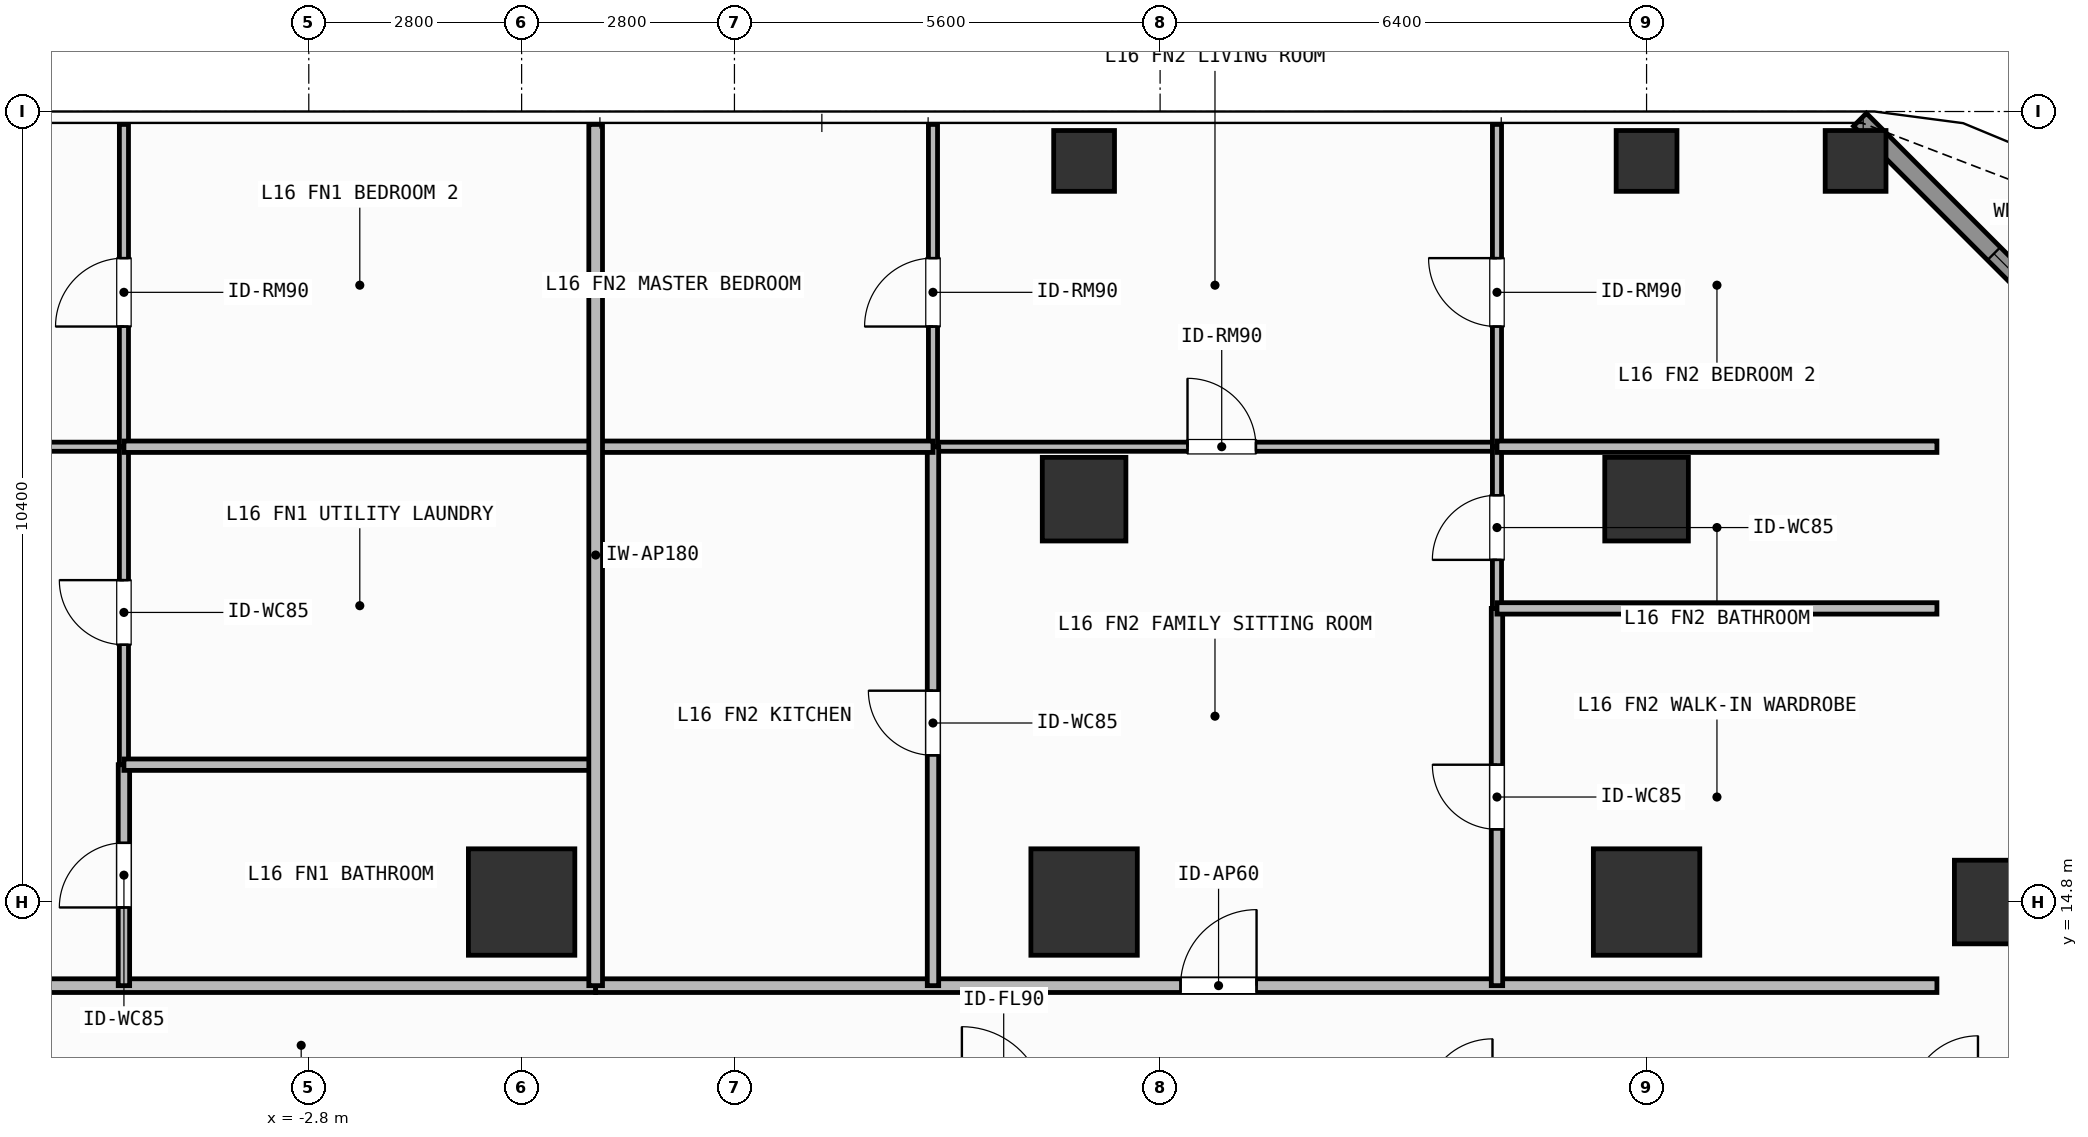
"""IFC4 building model, lengths in metres.
Left out: names, types, materials, properties, quantities, classifications, styles, units other than length and angle.
Written with IfcOpenShell. Run it as: python <this file> out.ifc"""

import sys

from ifc_helpers import new_model, si_unit, direction, frame, frame_2d, origin, origin_2d, place, context, subcontext, project, spatial, rectangle, hollow_rectangle, extrude, element, fill, save


model = new_model("IFC4")
c1 = context("Model", 3, precision=1e-05, world=origin(), true_north=direction((0.0, 1.0)))
c2 = subcontext(c1, "Body", "Model", "MODEL_VIEW")
j1 = project(units=[si_unit("LENGTHUNIT", "METRE"), si_unit("PLANEANGLEUNIT", "RADIAN")], contexts=[c1])
p1 = place(None, origin())
s1 = spatial("IfcSite", under=j1, at=p1, CompositionType="ELEMENT")
p2 = place(p1, origin())
s2 = spatial("IfcBuilding", under=s1, at=p2, CompositionType="ELEMENT")
p3 = place(p2, frame((0.0, 0.0, 61.8)))
s3 = spatial("IfcBuildingStorey", under=s2, at=p3, CompositionType="ELEMENT", Elevation=61.8)
for number, where, z_axis, x_axis in (
    (1, (0.0, 14.8, 0.0), (0.0, 0.0, 1.0), (1.0, 0.0, 0.0)),
    (2, (7.4, 14.8, 0.0), (0.0, 0.0, 1.0), (1.0, 0.0, 0.0)),
    (3, (14.8, 14.8, 0.0), (0.0, 0.0, 1.0), (1.0, 0.0, 0.0)),
):
    element("IfcColumn", number, at=place(p3, frame(where, z_axis=z_axis, x_axis=x_axis)), inside=s3, PredefinedType="COLUMN", context=c2, shape_type="SweptSolid", body=[
        extrude(rectangle(XDim=1.4, YDim=1.4, at=origin_2d()), origin(), (0.0, 0.0, 1.0), 3.9),
    ])
for number, where, z_axis, x_axis in (
    (4, (19.4, 14.8, 0.0), (0.0, 0.0, 1.0), (1.0, 0.0, 0.0)),
    (5, (7.4, 20.1, 0.0), (0.0, 0.0, 1.0), (1.0, 0.0, 0.0)),
    (6, (14.8, 20.1, 0.0), (0.0, 0.0, 1.0), (1.0, 0.0, 0.0)),
):
    element("IfcColumn", number, at=place(p3, frame(where, z_axis=z_axis, x_axis=x_axis)), inside=s3, PredefinedType="COLUMN", context=c2, shape_type="SweptSolid", body=[
        extrude(rectangle(XDim=1.1, YDim=1.1, at=origin_2d()), origin(), (0.0, 0.0, 1.0), 3.9),
    ])
for number, where, z_axis, x_axis in (
    (7, (17.55, 24.55, 0.0), (0.0, 0.0, 1.0), (1.0, 0.0, 0.0)),
    (8, (7.4, 24.55, 0.0), (0.0, 0.0, 1.0), (1.0, 0.0, 0.0)),
    (9, (14.8, 24.55, 0.0), (0.0, 0.0, 1.0), (1.0, 0.0, 0.0)),
):
    element("IfcColumn", number, at=place(p3, frame(where, z_axis=z_axis, x_axis=x_axis)), inside=s3, PredefinedType="COLUMN", context=c2, shape_type="SweptSolid", body=[
        extrude(hollow_rectangle(XDim=0.8, YDim=0.8, WallThickness=0.036, at=origin_2d()), origin(), (0.0, 0.0, 1.0), 3.9),
    ])
p4 = place(p3, frame((17.608, 25.092, 0.0), z_axis=(0.0, 0.0, 1.0), x_axis=(0.707106781187, -0.707106781187, 0.0)))
e10 = element("IfcWall", 10, at=p4, inside=s3, PredefinedType="SOLIDWALL", context=c2, shape_type="SweptSolid", body=[
    extrude(rectangle(XDim=6.484, YDim=0.24, at=frame_2d((3.242, 0.0))), origin(), (0.0, 0.0, 1.0), 3.68),
])
p5 = place(p4, frame((2.492, 0.0, 0.8)))
e11 = element("IfcOpeningElement", 11, at=p5, cuts=e10, PredefinedType="OPENING", context=c2, shape_type="SweptSolid", body=[
    extrude(rectangle(XDim=1.5, YDim=1.85, at=frame_2d((0.75, 0.925))), frame((0.0, 0.13, 0.0), z_axis=(0.0, -1.0, 0.0), x_axis=(1.0, 0.0, 0.0)), (0.0, 0.0, 1.0), 0.26),
])
p6 = place(p3, frame((-24.42, 13.7, 0.0), z_axis=(0.0, 0.0, 1.0), x_axis=(1.0, 0.0, 0.0)))
e12 = element("IfcWall", 12, at=p6, inside=s3, PredefinedType="PARTITIONING", context=c2, shape_type="SweptSolid", body=[
    extrude(rectangle(XDim=25.394, YDim=0.18, at=frame_2d((12.697, 0.0))), origin(), (0.0, 0.0, 1.0), 3.68),
])
p7 = place(p6, frame((10.4, 0.0, 0.0)))
e13 = element("IfcOpeningElement", 13, at=p7, cuts=e12, PredefinedType="OPENING", context=c2, shape_type="SweptSolid", body=[
    extrude(rectangle(XDim=1.0, YDim=2.2, at=frame_2d((0.5, 1.1))), frame((0.0, 0.1, 0.0), z_axis=(0.0, -1.0, 0.0), x_axis=(1.0, 0.0, 0.0)), (0.0, 0.0, 1.0), 0.2),
])
p8 = place(p3, frame((-12.805, 20.79, 0.0), z_axis=(0.0, 0.0, 1.0), x_axis=(1.0, 0.0, 0.0)))
e14 = element("IfcWall", 14, at=p8, inside=s3, PredefinedType="PARTITIONING", context=c2, shape_type="SweptSolid", body=[
    extrude(rectangle(XDim=7.573, YDim=0.12, at=frame_2d((3.787, 0.0))), origin(), (0.0, 0.0, 1.0), 3.68),
])
p9 = place(p8, frame((3.336, 0.0, 0.0)))
e15 = element("IfcOpeningElement", 15, at=p9, cuts=e14, PredefinedType="OPENING", context=c2, shape_type="SweptSolid", body=[
    extrude(rectangle(XDim=0.9, YDim=2.1, at=frame_2d((0.45, 1.05))), frame((0.0, 0.07, 0.0), z_axis=(0.0, -1.0, 0.0), x_axis=(1.0, 0.0, 0.0)), (0.0, 0.0, 1.0), 0.14),
])
p10 = place(p3, frame((-5.232, 13.7, 0.0), z_axis=(0.0, 0.0, 1.0), x_axis=(0.0, 1.0, 0.0)))
e16 = element("IfcWall", 16, at=p10, inside=s3, PredefinedType="PARTITIONING", context=c2, shape_type="SweptSolid", body=[
    extrude(rectangle(XDim=2.907, YDim=0.15, at=frame_2d((1.454, 0.0))), origin(), (0.0, 0.0, 1.0), 3.68),
])
p11 = place(p10, frame((1.029, 0.0, 0.0)))
e17 = element("IfcOpeningElement", 17, at=p11, cuts=e16, PredefinedType="OPENING", context=c2, shape_type="SweptSolid", body=[
    extrude(rectangle(XDim=0.85, YDim=2.1, at=frame_2d((0.425, 1.05))), frame((0.0, 0.085, 0.0), z_axis=(0.0, -1.0, 0.0), x_axis=(1.0, 0.0, 0.0)), (0.0, 0.0, 1.0), 0.17),
])
p12 = place(p3, frame((-5.232, 16.607, 0.0), z_axis=(0.0, 0.0, 1.0), x_axis=(0.0, 1.0, 0.0)))
e18 = element("IfcWall", 18, at=p12, inside=s3, PredefinedType="PARTITIONING", context=c2, shape_type="SweptSolid", body=[
    extrude(rectangle(XDim=4.183, YDim=0.12, at=frame_2d((2.092, 0.0))), origin(), (0.0, 0.0, 1.0), 3.68),
])
p13 = place(p12, frame((1.578, 0.0, 0.0)))
e19 = element("IfcOpeningElement", 19, at=p13, cuts=e18, PredefinedType="OPENING", context=c2, shape_type="SweptSolid", body=[
    extrude(rectangle(XDim=0.85, YDim=2.1, at=frame_2d((0.425, 1.05))), frame((0.0, 0.07, 0.0), z_axis=(0.0, -1.0, 0.0), x_axis=(1.0, 0.0, 0.0)), (0.0, 0.0, 1.0), 0.14),
])
p14 = place(p3, frame((-5.232, 20.79, 0.0), z_axis=(0.0, 0.0, 1.0), x_axis=(0.0, 1.0, 0.0)))
e20 = element("IfcWall", 20, at=p14, inside=s3, PredefinedType="PARTITIONING", context=c2, shape_type="SweptSolid", body=[
    extrude(rectangle(XDim=4.24, YDim=0.12, at=frame_2d((2.12, 0.0))), origin(), (0.0, 0.0, 1.0), 3.68),
])
p15 = place(p14, frame((1.581, 0.0, 0.0)))
e21 = element("IfcOpeningElement", 21, at=p15, cuts=e20, PredefinedType="OPENING", context=c2, shape_type="SweptSolid", body=[
    extrude(rectangle(XDim=0.9, YDim=2.1, at=frame_2d((0.45, 1.05))), frame((0.0, 0.07, 0.0), z_axis=(0.0, -1.0, 0.0), x_axis=(1.0, 0.0, 0.0)), (0.0, 0.0, 1.0), 0.14),
])
p16 = place(p3, frame((0.974, 13.7, 0.0), z_axis=(0.0, 0.0, 1.0), x_axis=(1.0, 0.0, 0.0)))
e22 = element("IfcWall", 22, at=p16, inside=s3, PredefinedType="PARTITIONING", context=c2, shape_type="SweptSolid", body=[
    extrude(rectangle(XDim=17.646, YDim=0.18, at=frame_2d((8.823, 0.0))), origin(), (0.0, 0.0, 1.0), 3.68),
])
p17 = place(p16, frame((7.695, 0.0, 0.0)))
e23 = element("IfcOpeningElement", 23, at=p17, cuts=e22, PredefinedType="OPENING", context=c2, shape_type="SweptSolid", body=[
    extrude(rectangle(XDim=1.0, YDim=2.2, at=frame_2d((0.5, 1.1))), frame((0.0, 0.1, 0.0), z_axis=(0.0, -1.0, 0.0), x_axis=(1.0, 0.0, 0.0)), (0.0, 0.0, 1.0), 0.2),
])
p18 = place(p3, frame((5.412, 20.79, 0.0), z_axis=(0.0, 0.0, 1.0), x_axis=(1.0, 0.0, 0.0)))
e24 = element("IfcWall", 24, at=p18, inside=s3, PredefinedType="PARTITIONING", context=c2, shape_type="SweptSolid", body=[
    extrude(rectangle(XDim=7.42, YDim=0.12, at=frame_2d((3.71, 0.0))), origin(), (0.0, 0.0, 1.0), 3.68),
])
p19 = place(p18, frame((3.349, 0.0, 0.0)))
e25 = element("IfcOpeningElement", 25, at=p19, cuts=e24, PredefinedType="OPENING", context=c2, shape_type="SweptSolid", body=[
    extrude(rectangle(XDim=0.9, YDim=2.1, at=frame_2d((0.45, 1.05))), frame((0.0, 0.07, 0.0), z_axis=(0.0, -1.0, 0.0), x_axis=(1.0, 0.0, 0.0)), (0.0, 0.0, 1.0), 0.14),
])
p20 = place(p3, frame((5.412, 13.7, 0.0), z_axis=(0.0, 0.0, 1.0), x_axis=(0.0, 1.0, 0.0)))
e26 = element("IfcWall", 26, at=p20, inside=s3, PredefinedType="PARTITIONING", context=c2, shape_type="SweptSolid", body=[
    extrude(rectangle(XDim=7.09, YDim=0.15, at=frame_2d((3.545, 0.0))), origin(), (0.0, 0.0, 1.0), 3.68),
])
p21 = place(p20, frame((3.03, 0.0, 0.0)))
e27 = element("IfcOpeningElement", 27, at=p21, cuts=e26, PredefinedType="OPENING", context=c2, shape_type="SweptSolid", body=[
    extrude(rectangle(XDim=0.85, YDim=2.1, at=frame_2d((0.425, 1.05))), frame((0.0, 0.085, 0.0), z_axis=(0.0, -1.0, 0.0), x_axis=(1.0, 0.0, 0.0)), (0.0, 0.0, 1.0), 0.17),
])
p22 = place(p3, frame((5.412, 20.79, 0.0), z_axis=(0.0, 0.0, 1.0), x_axis=(0.0, 1.0, 0.0)))
e28 = element("IfcWall", 28, at=p22, inside=s3, PredefinedType="PARTITIONING", context=c2, shape_type="SweptSolid", body=[
    extrude(rectangle(XDim=4.24, YDim=0.12, at=frame_2d((2.12, 0.0))), origin(), (0.0, 0.0, 1.0), 3.68),
])
p23 = place(p22, frame((1.581, 0.0, 0.0)))
e29 = element("IfcOpeningElement", 29, at=p23, cuts=e28, PredefinedType="OPENING", context=c2, shape_type="SweptSolid", body=[
    extrude(rectangle(XDim=0.9, YDim=2.1, at=frame_2d((0.45, 1.05))), frame((0.0, 0.07, 0.0), z_axis=(0.0, -1.0, 0.0), x_axis=(1.0, 0.0, 0.0)), (0.0, 0.0, 1.0), 0.14),
])
p24 = place(p3, frame((12.832, 13.7, 0.0), z_axis=(0.0, 0.0, 1.0), x_axis=(0.0, 1.0, 0.0)))
e30 = element("IfcWall", 30, at=p24, inside=s3, PredefinedType="PARTITIONING", context=c2, shape_type="SweptSolid", body=[
    extrude(rectangle(XDim=4.963, YDim=0.15, at=frame_2d((2.481, 0.0))), origin(), (0.0, 0.0, 1.0), 3.68),
])
p25 = place(p24, frame((2.056, 0.0, 0.0)))
e31 = element("IfcOpeningElement", 31, at=p25, cuts=e30, PredefinedType="OPENING", context=c2, shape_type="SweptSolid", body=[
    extrude(rectangle(XDim=0.85, YDim=2.1, at=frame_2d((0.425, 1.05))), frame((0.0, 0.085, 0.0), z_axis=(0.0, -1.0, 0.0), x_axis=(1.0, 0.0, 0.0)), (0.0, 0.0, 1.0), 0.17),
])
p26 = place(p3, frame((12.832, 18.663, 0.0), z_axis=(0.0, 0.0, 1.0), x_axis=(0.0, 1.0, 0.0)))
e32 = element("IfcWall", 32, at=p26, inside=s3, PredefinedType="PARTITIONING", context=c2, shape_type="SweptSolid", body=[
    extrude(rectangle(XDim=2.127, YDim=0.12, at=frame_2d((1.063, 0.0))), origin(), (0.0, 0.0, 1.0), 3.68),
])
p27 = place(p26, frame((0.638, 0.0, 0.0)))
e33 = element("IfcOpeningElement", 33, at=p27, cuts=e32, PredefinedType="OPENING", context=c2, shape_type="SweptSolid", body=[
    extrude(rectangle(XDim=0.85, YDim=2.1, at=frame_2d((0.425, 1.05))), frame((0.0, 0.07, 0.0), z_axis=(0.0, -1.0, 0.0), x_axis=(1.0, 0.0, 0.0)), (0.0, 0.0, 1.0), 0.14),
])
p28 = place(p3, frame((12.832, 20.79, 0.0), z_axis=(0.0, 0.0, 1.0), x_axis=(0.0, 1.0, 0.0)))
e34 = element("IfcWall", 34, at=p28, inside=s3, PredefinedType="PARTITIONING", context=c2, shape_type="SweptSolid", body=[
    extrude(rectangle(XDim=4.24, YDim=0.12, at=frame_2d((2.12, 0.0))), origin(), (0.0, 0.0, 1.0), 3.68),
])
p29 = place(p28, frame((1.581, 0.0, 0.0)))
e35 = element("IfcOpeningElement", 35, at=p29, cuts=e34, PredefinedType="OPENING", context=c2, shape_type="SweptSolid", body=[
    extrude(rectangle(XDim=0.9, YDim=2.1, at=frame_2d((0.45, 1.05))), frame((0.0, 0.07, 0.0), z_axis=(0.0, -1.0, 0.0), x_axis=(1.0, 0.0, 0.0)), (0.0, 0.0, 1.0), 0.14),
])
for number, where, z_axis, x_axis in (
    (36, (-5.232, 16.607, 0.0), (0.0, 0.0, 1.0), (1.0, 0.0, 0.0)),
    (37, (-5.232, 20.79, 0.0), (0.0, 0.0, 1.0), (1.0, 0.0, 0.0)),
):
    element("IfcWall", number, at=place(p3, frame(where, z_axis=z_axis, x_axis=x_axis)), inside=s3, PredefinedType="PARTITIONING", context=c2, shape_type="SweptSolid", body=[
        extrude(rectangle(XDim=6.206, YDim=0.15, at=frame_2d((3.103, 0.0))), origin(), (0.0, 0.0, 1.0), 3.68),
    ])
p30 = place(p3, frame((0.974, 20.79, 0.0), z_axis=(0.0, 0.0, 1.0), x_axis=(1.0, 0.0, 0.0)))
e38 = element("IfcWall", 38, at=p30, inside=s3, PredefinedType="PARTITIONING", context=c2, shape_type="SweptSolid", body=[
    extrude(rectangle(XDim=4.438, YDim=0.15, at=frame_2d((2.219, 0.0))), origin(), (0.0, 0.0, 1.0), 3.68),
])
for number, where, z_axis, x_axis in (
    (39, (12.832, 18.663, 0.0), (0.0, 0.0, 1.0), (1.0, 0.0, 0.0)),
    (40, (12.832, 20.79, 0.0), (0.0, 0.0, 1.0), (1.0, 0.0, 0.0)),
):
    element("IfcWall", number, at=place(p3, frame(where, z_axis=z_axis, x_axis=x_axis)), inside=s3, PredefinedType="PARTITIONING", context=c2, shape_type="SweptSolid", body=[
        extrude(rectangle(XDim=5.788, YDim=0.15, at=frame_2d((2.894, 0.0))), origin(), (0.0, 0.0, 1.0), 3.68),
    ])
p31 = place(p3, frame((0.974, 13.7, 0.0), z_axis=(0.0, 0.0, 1.0), x_axis=(0.0, 1.0, 0.0)))
e41 = element("IfcWall", 41, at=p31, inside=s3, PredefinedType="PARTITIONING", context=c2, shape_type="SweptSolid", body=[
    extrude(rectangle(XDim=11.33, YDim=0.18, at=frame_2d((5.665, 0.0))), origin(), (0.0, 0.0, 1.0), 3.68),
])
p32 = place(p5, origin())
e42 = element("IfcWindow", 42, at=p32, inside=s3, PartitioningType="SINGLE_PANEL", PredefinedType="WINDOW", context=c2, shape_type="SweptSolid", body=[
    extrude(rectangle(XDim=1.5, YDim=1.85, at=frame_2d((0.75, 0.925))), frame((0.0, 0.03, 0.0), z_axis=(0.0, -1.0, 0.0), x_axis=(1.0, 0.0, 0.0)), (0.0, 0.0, 1.0), 0.06),
])
fill(e11, e42)
p33 = place(p11, origin())
e43 = element("IfcDoor", 43, at=p33, inside=s3, OperationType="SINGLE_SWING_LEFT", PredefinedType="DOOR", context=c2, shape_type="SweptSolid", body=[
    extrude(rectangle(XDim=0.85, YDim=2.1, at=frame_2d((0.425, 1.05))), frame((0.0, 0.025, 0.0), z_axis=(0.0, -1.0, 0.0), x_axis=(1.0, 0.0, 0.0)), (0.0, 0.0, 1.0), 0.05),
])
fill(e17, e43)
p34 = place(p13, origin())
e44 = element("IfcDoor", 44, at=p34, inside=s3, OperationType="SINGLE_SWING_RIGHT", PredefinedType="DOOR", context=c2, shape_type="SweptSolid", body=[
    extrude(rectangle(XDim=0.85, YDim=2.1, at=frame_2d((0.425, 1.05))), frame((0.0, 0.025, 0.0), z_axis=(0.0, -1.0, 0.0), x_axis=(1.0, 0.0, 0.0)), (0.0, 0.0, 1.0), 0.05),
])
fill(e19, e44)
p35 = place(p15, origin())
e45 = element("IfcDoor", 45, at=p35, inside=s3, OperationType="SINGLE_SWING_LEFT", PredefinedType="DOOR", context=c2, shape_type="SweptSolid", body=[
    extrude(rectangle(XDim=0.9, YDim=2.1, at=frame_2d((0.45, 1.05))), frame((0.0, 0.025, 0.0), z_axis=(0.0, -1.0, 0.0), x_axis=(1.0, 0.0, 0.0)), (0.0, 0.0, 1.0), 0.05),
])
fill(e21, e45)
p36 = place(p17, origin())
e46 = element("IfcDoor", 46, at=p36, inside=s3, OperationType="SINGLE_SWING_RIGHT", PredefinedType="DOOR", context=c2, shape_type="SweptSolid", body=[
    extrude(rectangle(XDim=1.0, YDim=2.2, at=frame_2d((0.5, 1.1))), frame((0.0, 0.025, 0.0), z_axis=(0.0, -1.0, 0.0), x_axis=(1.0, 0.0, 0.0)), (0.0, 0.0, 1.0), 0.05),
])
fill(e23, e46)
p37 = place(p19, origin())
e47 = element("IfcDoor", 47, at=p37, inside=s3, OperationType="SINGLE_SWING_LEFT", PredefinedType="DOOR", context=c2, shape_type="SweptSolid", body=[
    extrude(rectangle(XDim=0.9, YDim=2.1, at=frame_2d((0.45, 1.05))), frame((0.0, 0.025, 0.0), z_axis=(0.0, -1.0, 0.0), x_axis=(1.0, 0.0, 0.0)), (0.0, 0.0, 1.0), 0.05),
])
fill(e25, e47)
p38 = place(p21, origin())
e48 = element("IfcDoor", 48, at=p38, inside=s3, OperationType="SINGLE_SWING_RIGHT", PredefinedType="DOOR", context=c2, shape_type="SweptSolid", body=[
    extrude(rectangle(XDim=0.85, YDim=2.1, at=frame_2d((0.425, 1.05))), frame((0.0, 0.025, 0.0), z_axis=(0.0, -1.0, 0.0), x_axis=(1.0, 0.0, 0.0)), (0.0, 0.0, 1.0), 0.05),
])
fill(e27, e48)
p39 = place(p23, origin())
e49 = element("IfcDoor", 49, at=p39, inside=s3, OperationType="SINGLE_SWING_LEFT", PredefinedType="DOOR", context=c2, shape_type="SweptSolid", body=[
    extrude(rectangle(XDim=0.9, YDim=2.1, at=frame_2d((0.45, 1.05))), frame((0.0, 0.025, 0.0), z_axis=(0.0, -1.0, 0.0), x_axis=(1.0, 0.0, 0.0)), (0.0, 0.0, 1.0), 0.05),
])
fill(e29, e49)
p40 = place(p25, origin())
e50 = element("IfcDoor", 50, at=p40, inside=s3, OperationType="SINGLE_SWING_RIGHT", PredefinedType="DOOR", context=c2, shape_type="SweptSolid", body=[
    extrude(rectangle(XDim=0.85, YDim=2.1, at=frame_2d((0.425, 1.05))), frame((0.0, 0.025, 0.0), z_axis=(0.0, -1.0, 0.0), x_axis=(1.0, 0.0, 0.0)), (0.0, 0.0, 1.0), 0.05),
])
fill(e31, e50)
p41 = place(p27, origin())
e51 = element("IfcDoor", 51, at=p41, inside=s3, OperationType="SINGLE_SWING_LEFT", PredefinedType="DOOR", context=c2, shape_type="SweptSolid", body=[
    extrude(rectangle(XDim=0.85, YDim=2.1, at=frame_2d((0.425, 1.05))), frame((0.0, 0.025, 0.0), z_axis=(0.0, -1.0, 0.0), x_axis=(1.0, 0.0, 0.0)), (0.0, 0.0, 1.0), 0.05),
])
fill(e33, e51)
p42 = place(p29, origin())
e52 = element("IfcDoor", 52, at=p42, inside=s3, OperationType="SINGLE_SWING_RIGHT", PredefinedType="DOOR", context=c2, shape_type="SweptSolid", body=[
    extrude(rectangle(XDim=0.9, YDim=2.1, at=frame_2d((0.45, 1.05))), frame((0.0, 0.025, 0.0), z_axis=(0.0, -1.0, 0.0), x_axis=(1.0, 0.0, 0.0)), (0.0, 0.0, 1.0), 0.05),
])
fill(e35, e52)
save(model, sys.argv[1])
